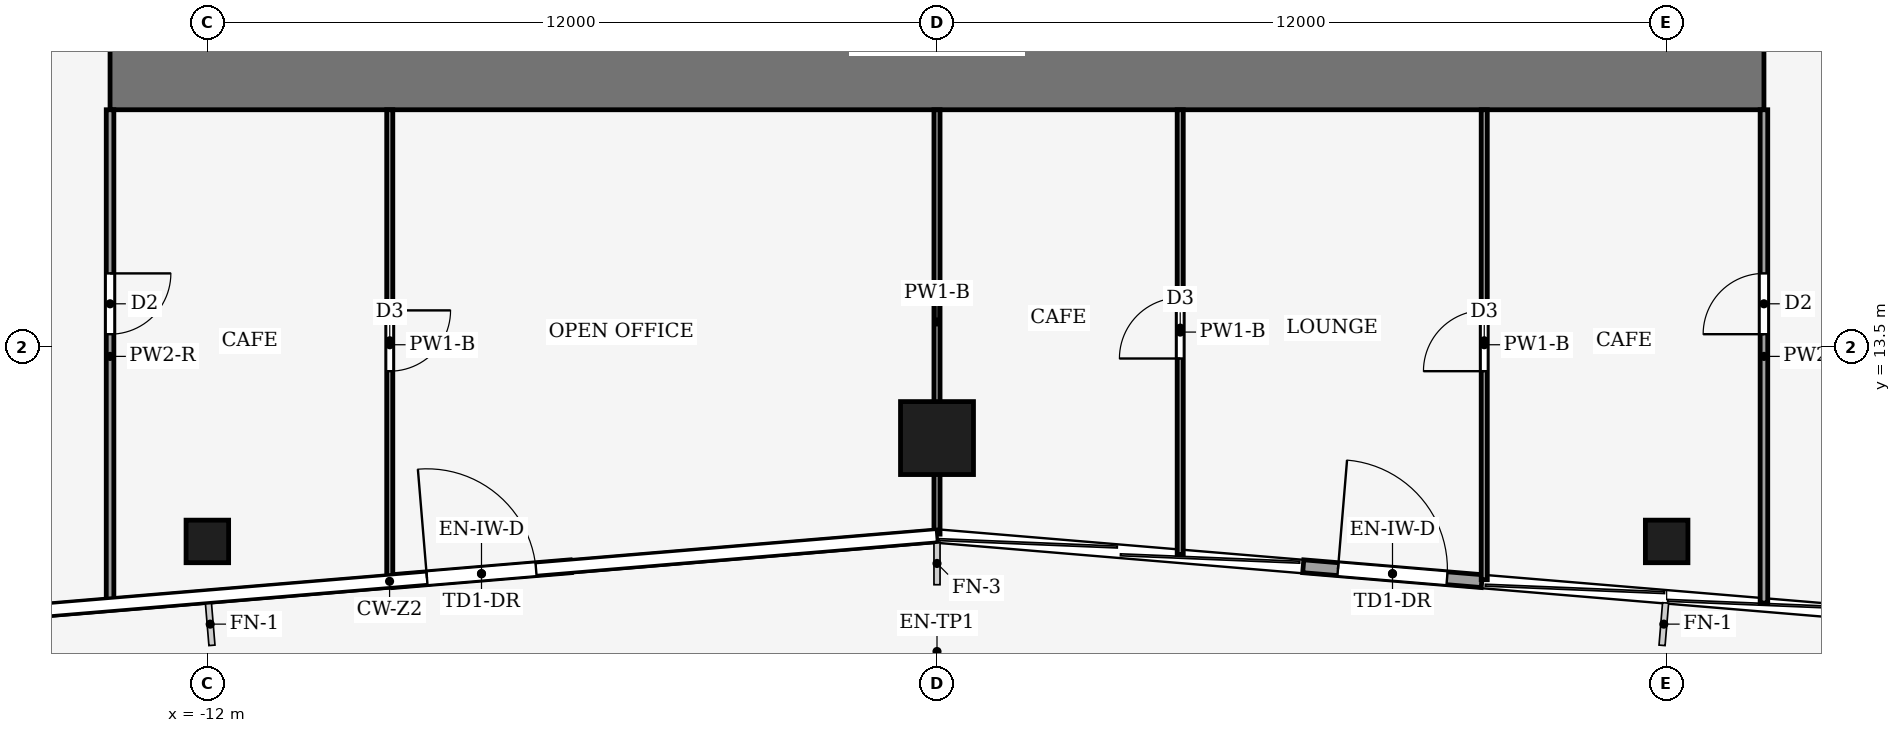
"""IFC4 building model, lengths in metres.
Left out: names, types, materials, properties, quantities, classifications, styles, units other than length and angle.
Written with IfcOpenShell. Run it as: python <this file> out.ifc"""

import sys

from ifc_helpers import new_model, si_unit, direction, frame, frame_2d, origin, origin_2d, place, context, subcontext, project, spatial, rectangle, hollow_rectangle, extrude, element, fill, save


model = new_model("IFC4")
c1 = context("Model", 3, precision=1e-05, world=origin(), true_north=direction((0.0, 1.0)))
c2 = subcontext(c1, "Body", "Model", "MODEL_VIEW")
j1 = project(units=[si_unit("LENGTHUNIT", "METRE"), si_unit("PLANEANGLEUNIT", "RADIAN")], contexts=[c1])
p1 = place(None, origin())
s1 = spatial("IfcSite", under=j1, at=p1, CompositionType="ELEMENT")
p2 = place(p1, origin())
s2 = spatial("IfcBuilding", under=s1, at=p2, CompositionType="ELEMENT")
p3 = place(p2, frame((0.0, 0.0, 121.0)))
s3 = spatial("IfcBuildingStorey", under=s2, at=p3, CompositionType="ELEMENT", Elevation=121.0)
p4 = place(p3, frame((-13.6, 17.9, -0.13), z_axis=(0.0, 0.0, 1.0), x_axis=(1.0, 0.0, 0.0)))
e1 = element("IfcWall", 1, at=p4, inside=s3, PredefinedType="SHEAR", context=c2, shape_type="SweptSolid", body=[
    extrude(rectangle(XDim=27.2, YDim=1.0, at=frame_2d((13.6, 0.0))), origin(), (0.0, 0.0, 1.0), 5.0),
])
p5 = place(p3, frame((0.0, 12.0, 0.0), z_axis=(0.0, 0.0, 1.0), x_axis=(1.0, 0.0, 0.0)))
e2 = element("IfcColumn", 2, at=p5, inside=s3, PredefinedType="COLUMN", context=c2, shape_type="SweptSolid", body=[
    extrude(hollow_rectangle(XDim=1.2, YDim=1.2, WallThickness=0.07, at=origin_2d()), origin(), (0.0, 0.0, 1.0), 5.0),
])
for number, where, z_axis, x_axis in (
    (3, (-12.0, 10.3, 0.0), (0.0, 0.0, 1.0), (1.0, 0.0, 0.0)),
    (4, (12.0, 10.3, 0.0), (0.0, 0.0, 1.0), (1.0, 0.0, 0.0)),
):
    element("IfcColumn", number, at=place(p3, frame(where, z_axis=z_axis, x_axis=x_axis)), inside=s3, PredefinedType="COLUMN", context=c2, shape_type="SweptSolid", body=[
        extrude(hollow_rectangle(XDim=0.7, YDim=0.7, WallThickness=0.03, at=origin_2d()), origin(), (0.0, 0.0, 1.0), 5.0),
    ])
p6 = place(p3, frame((-8.959, 9.647, 0.0), z_axis=(0.0, 0.0, 1.0), x_axis=(0.99654690113, 0.083031764089, 0.0)))
e5 = element("IfcWall", 5, at=p6, inside=s3, PredefinedType="SOLIDWALL", context=c2, shape_type="SweptSolid", body=[
    extrude(rectangle(XDim=2.946, YDim=0.212, at=frame_2d((1.473, 0.0))), origin(), (0.0, 0.0, 1.0), 4.65),
])
p7 = place(p6, frame((0.573, 0.0, 0.0)))
e6 = element("IfcOpeningElement", 6, at=p7, cuts=e5, PredefinedType="OPENING", context=c2, shape_type="SweptSolid", body=[
    extrude(rectangle(XDim=1.8, YDim=2.4, at=frame_2d((0.9, 1.2))), frame((0.0, 0.116, 0.0), z_axis=(0.0, -1.0, 0.0), x_axis=(1.0, 0.0, 0.0)), (0.0, 0.0, 1.0), 0.232),
])
p8 = place(p3, frame((6.023, 9.892, 0.0), z_axis=(0.0, 0.0, 1.0), x_axis=(0.99654690113, -0.083031764089, 0.0)))
e7 = element("IfcWall", 7, at=p8, inside=s3, PredefinedType="SOLIDWALL", context=c2, shape_type="SweptSolid", body=[
    extrude(rectangle(XDim=2.946, YDim=0.212, at=frame_2d((1.473, 0.0))), origin(), (0.0, 0.0, 1.0), 4.65),
])
p9 = place(p8, frame((0.573, 0.0, 0.0)))
e8 = element("IfcOpeningElement", 8, at=p9, cuts=e7, PredefinedType="OPENING", context=c2, shape_type="SweptSolid", body=[
    extrude(rectangle(XDim=1.8, YDim=2.4, at=frame_2d((0.9, 1.2))), frame((0.0, 0.116, 0.0), z_axis=(0.0, -1.0, 0.0), x_axis=(1.0, 0.0, 0.0)), (0.0, 0.0, 1.0), 0.232),
])
p10 = place(p3, frame((-13.6, 17.4, 0.0), z_axis=(0.0, 0.0, 1.0), x_axis=(0.0, -1.0, 0.0)))
e9 = element("IfcWall", 9, at=p10, inside=s3, PredefinedType="PARTITIONING", context=c2, shape_type="SweptSolid", body=[
    extrude(rectangle(XDim=8.113, YDim=0.125, at=frame_2d((4.057, 0.0))), origin(), (0.0, 0.0, 1.0), 4.04),
])
p11 = place(p10, frame((2.692, 0.0, 0.0)))
e10 = element("IfcOpeningElement", 10, at=p11, cuts=e9, PredefinedType="OPENING", context=c2, shape_type="SweptSolid", body=[
    extrude(rectangle(XDim=1.0, YDim=2.1, at=frame_2d((0.5, 1.05))), frame((0.0, 0.073, 0.0), z_axis=(0.0, -1.0, 0.0), x_axis=(1.0, 0.0, 0.0)), (0.0, 0.0, 1.0), 0.145),
])
p12 = place(p3, frame((13.6, 9.287, 0.0), z_axis=(0.0, 0.0, 1.0), x_axis=(0.0, 1.0, 0.0)))
e11 = element("IfcWall", 11, at=p12, inside=s3, PredefinedType="PARTITIONING", context=c2, shape_type="SweptSolid", body=[
    extrude(rectangle(XDim=8.113, YDim=0.125, at=frame_2d((4.057, 0.0))), origin(), (0.0, 0.0, 1.0), 4.04),
])
p13 = place(p12, frame((4.422, 0.0, 0.0)))
e12 = element("IfcOpeningElement", 12, at=p13, cuts=e11, PredefinedType="OPENING", context=c2, shape_type="SweptSolid", body=[
    extrude(rectangle(XDim=1.0, YDim=2.1, at=frame_2d((0.5, 1.05))), frame((0.0, 0.073, 0.0), z_axis=(0.0, -1.0, 0.0), x_axis=(1.0, 0.0, 0.0)), (0.0, 0.0, 1.0), 0.145),
])
p14 = place(p3, frame((-9.0, 17.4, 0.0), z_axis=(0.0, 0.0, 1.0), x_axis=(0.0, -1.0, 0.0)))
e13 = element("IfcWall", 13, at=p14, inside=s3, PredefinedType="PARTITIONING", context=c2, shape_type="SweptSolid", body=[
    extrude(rectangle(XDim=7.73, YDim=0.1, at=frame_2d((3.865, 0.0))), origin(), (0.0, 0.0, 1.0), 4.04),
])
p15 = place(p14, frame((3.3, 0.0, 0.0)))
e14 = element("IfcOpeningElement", 14, at=p15, cuts=e13, PredefinedType="OPENING", context=c2, shape_type="SweptSolid", body=[
    extrude(rectangle(XDim=1.0, YDim=2.1, at=frame_2d((0.5, 1.05))), frame((0.0, 0.06, 0.0), z_axis=(0.0, -1.0, 0.0), x_axis=(1.0, 0.0, 0.0)), (0.0, 0.0, 1.0), 0.12),
])
p16 = place(p3, frame((0.0, 10.42, 0.0), z_axis=(0.0, 0.0, 1.0), x_axis=(0.0, 1.0, 0.0)))
e15 = element("IfcWall", 15, at=p16, inside=s3, PredefinedType="PARTITIONING", context=c2, shape_type="SweptSolid", body=[
    extrude(rectangle(XDim=6.98, YDim=0.1, at=frame_2d((3.49, 0.0))), origin(), (0.0, 0.0, 1.0), 4.04),
])
p17 = place(p3, frame((9.0, 9.67, 0.0), z_axis=(0.0, 0.0, 1.0), x_axis=(0.0, 1.0, 0.0)))
e16 = element("IfcWall", 16, at=p17, inside=s3, PredefinedType="PARTITIONING", context=c2, shape_type="SweptSolid", body=[
    extrude(rectangle(XDim=7.73, YDim=0.1, at=frame_2d((3.865, 0.0))), origin(), (0.0, 0.0, 1.0), 4.04),
])
p18 = place(p17, frame((3.43, 0.0, 0.0)))
e17 = element("IfcOpeningElement", 17, at=p18, cuts=e16, PredefinedType="OPENING", context=c2, shape_type="SweptSolid", body=[
    extrude(rectangle(XDim=1.0, YDim=2.1, at=frame_2d((0.5, 1.05))), frame((0.0, 0.06, 0.0), z_axis=(0.0, -1.0, 0.0), x_axis=(1.0, 0.0, 0.0)), (0.0, 0.0, 1.0), 0.12),
])
p19 = place(p3, frame((4.0, 10.087, 0.0), z_axis=(0.0, 0.0, 1.0), x_axis=(0.0, 1.0, 0.0)))
e18 = element("IfcWall", 18, at=p19, inside=s3, PredefinedType="PARTITIONING", context=c2, shape_type="SweptSolid", body=[
    extrude(rectangle(XDim=7.313, YDim=0.1, at=frame_2d((3.657, 0.0))), origin(), (0.0, 0.0, 1.0), 4.04),
])
p20 = place(p19, frame((3.222, 0.0, 0.0)))
e19 = element("IfcOpeningElement", 19, at=p20, cuts=e18, PredefinedType="OPENING", context=c2, shape_type="SweptSolid", body=[
    extrude(rectangle(XDim=1.0, YDim=2.1, at=frame_2d((0.5, 1.05))), frame((0.0, 0.06, 0.0), z_axis=(0.0, -1.0, 0.0), x_axis=(1.0, 0.0, 0.0)), (0.0, 0.0, 1.0), 0.12),
])
p21 = place(p7, origin())
e20 = element("IfcDoor", 20, at=p21, inside=s3, OperationType="DOUBLE_DOOR_SINGLE_SWING", PredefinedType="DOOR", context=c2, shape_type="SweptSolid", body=[
    extrude(rectangle(XDim=1.8, YDim=2.4, at=frame_2d((0.9, 1.2))), frame((0.0, 0.025, 0.0), z_axis=(0.0, -1.0, 0.0), x_axis=(1.0, 0.0, 0.0)), (0.0, 0.0, 1.0), 0.05),
])
fill(e6, e20)
p22 = place(p9, origin())
e21 = element("IfcDoor", 21, at=p22, inside=s3, OperationType="DOUBLE_DOOR_SINGLE_SWING", PredefinedType="DOOR", context=c2, shape_type="SweptSolid", body=[
    extrude(rectangle(XDim=1.8, YDim=2.4, at=frame_2d((0.9, 1.2))), frame((0.0, 0.025, 0.0), z_axis=(0.0, -1.0, 0.0), x_axis=(1.0, 0.0, 0.0)), (0.0, 0.0, 1.0), 0.05),
])
fill(e8, e21)
p23 = place(p11, origin())
e22 = element("IfcDoor", 22, at=p23, inside=s3, OperationType="SINGLE_SWING_LEFT", PredefinedType="DOOR", context=c2, shape_type="SweptSolid", body=[
    extrude(rectangle(XDim=1.0, YDim=2.1, at=frame_2d((0.5, 1.05))), frame((0.0, 0.025, 0.0), z_axis=(0.0, -1.0, 0.0), x_axis=(1.0, 0.0, 0.0)), (0.0, 0.0, 1.0), 0.05),
])
fill(e10, e22)
p24 = place(p13, origin())
e23 = element("IfcDoor", 23, at=p24, inside=s3, OperationType="SINGLE_SWING_RIGHT", PredefinedType="DOOR", context=c2, shape_type="SweptSolid", body=[
    extrude(rectangle(XDim=1.0, YDim=2.1, at=frame_2d((0.5, 1.05))), frame((0.0, 0.025, 0.0), z_axis=(0.0, -1.0, 0.0), x_axis=(1.0, 0.0, 0.0)), (0.0, 0.0, 1.0), 0.05),
])
fill(e12, e23)
p25 = place(p15, origin())
e24 = element("IfcDoor", 24, at=p25, inside=s3, OperationType="SINGLE_SWING_LEFT", PredefinedType="DOOR", context=c2, shape_type="SweptSolid", body=[
    extrude(rectangle(XDim=1.0, YDim=2.1, at=frame_2d((0.5, 1.05))), frame((0.0, 0.025, 0.0), z_axis=(0.0, -1.0, 0.0), x_axis=(1.0, 0.0, 0.0)), (0.0, 0.0, 1.0), 0.05),
])
fill(e14, e24)
p26 = place(p18, origin())
e25 = element("IfcDoor", 25, at=p26, inside=s3, OperationType="SINGLE_SWING_RIGHT", PredefinedType="DOOR", context=c2, shape_type="SweptSolid", body=[
    extrude(rectangle(XDim=1.0, YDim=2.1, at=frame_2d((0.5, 1.05))), frame((0.0, 0.025, 0.0), z_axis=(0.0, -1.0, 0.0), x_axis=(1.0, 0.0, 0.0)), (0.0, 0.0, 1.0), 0.05),
])
fill(e17, e25)
p27 = place(p20, origin())
e26 = element("IfcDoor", 26, at=p27, inside=s3, OperationType="SINGLE_SWING_RIGHT", PredefinedType="DOOR", context=c2, shape_type="SweptSolid", body=[
    extrude(rectangle(XDim=1.0, YDim=2.1, at=frame_2d((0.5, 1.05))), frame((0.0, 0.025, 0.0), z_axis=(0.0, -1.0, 0.0), x_axis=(1.0, 0.0, 0.0)), (0.0, 0.0, 1.0), 0.05),
])
fill(e19, e26)
save(model, sys.argv[1])
